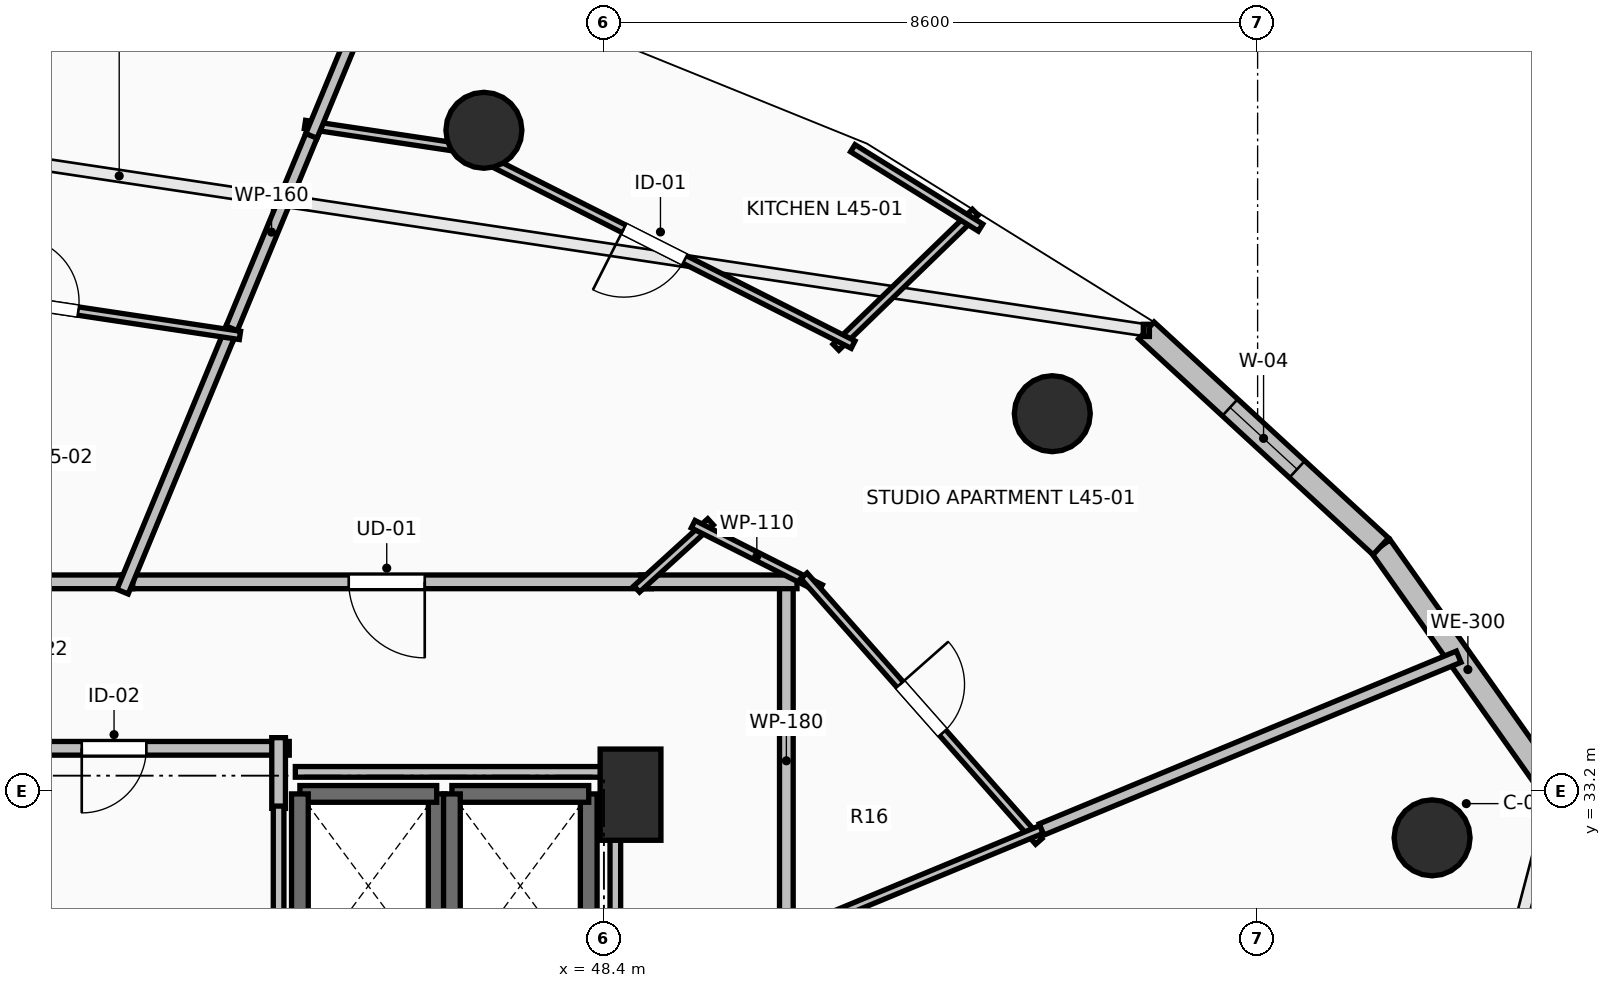
"""IFC4 building model, lengths in metres.
Left out: names, types, materials, properties, quantities, classifications, styles, units other than length and angle.
Written with IfcOpenShell. Run it as: python <this file> out.ifc"""

import sys

from ifc_helpers import new_model, si_unit, direction, frame, frame_2d, origin, origin_2d, place, context, subcontext, project, spatial, rectangle, circle, extrude, element, fill, save


model = new_model("IFC4")
c1 = context("Model", 3, precision=1e-05, world=origin(), true_north=direction((0.0, 1.0)))
c2 = subcontext(c1, "Body", "Model", "MODEL_VIEW")
j1 = project(units=[si_unit("LENGTHUNIT", "METRE"), si_unit("PLANEANGLEUNIT", "RADIAN")], contexts=[c1])
p1 = place(None, origin())
s1 = spatial("IfcSite", under=j1, at=p1, CompositionType="ELEMENT")
p2 = place(p1, origin())
s2 = spatial("IfcBuilding", under=s1, at=p2, CompositionType="ELEMENT")
p3 = place(p2, frame((0.0, 0.0, 167.6)))
s3 = spatial("IfcBuildingStorey", under=s2, at=p3, CompositionType="ELEMENT", Elevation=167.6)
for number, where, z_axis, x_axis in (
    (1, (59.295, 32.582, 0.0), (0.0, 0.0, 1.0), (0.924, 0.383, 0.0)),
    (2, (54.299, 38.162, 0.0), (0.0, 0.0, 1.0), (0.707, 0.707, 0.0)),
    (3, (46.821, 41.891, 0.0), (0.0, 0.0, 1.0), (0.383, 0.924, 0.0)),
):
    element("IfcColumn", number, at=place(p3, frame(where, z_axis=z_axis, x_axis=x_axis)), inside=s3, PredefinedType="COLUMN", context=c2, shape_type="SweptSolid", body=[
        extrude(circle(Radius=0.5, at=origin_2d()), origin(), (0.0, 0.0, 1.0), 3.5),
    ])
p4 = place(p3, frame((48.75, 33.15, 0.0), z_axis=(0.0, 0.0, 1.0), x_axis=(1.0, 0.0, 0.0)))
e4 = element("IfcColumn", 4, at=p4, inside=s3, PredefinedType="PILASTER", context=c2, shape_type="SweptSolid", body=[
    extrude(rectangle(XDim=0.8, YDim=1.2, at=origin_2d()), origin(), (0.0, 0.0, 1.0), 3.5),
])
p5 = place(p3, frame((60.912, 33.175, 0.0), z_axis=(0.0, 0.0, 1.0), x_axis=(-0.577269753207, 0.816553508371, 0.0)))
e5 = element("IfcWall", 5, at=p5, inside=s3, PredefinedType="STANDARD", context=c2, shape_type="SweptSolid", body=[
    extrude(rectangle(XDim=3.97, YDim=0.3, at=frame_2d((1.985, 0.0))), origin(), (0.0, 0.0, 1.0), 3.24),
])
p6 = place(p3, frame((58.62, 36.417, 0.0), z_axis=(0.0, 0.0, 1.0), x_axis=(-0.735477154165, 0.677549522693, 0.0)))
e6 = element("IfcWall", 6, at=p6, inside=s3, PredefinedType="STANDARD", context=c2, shape_type="SweptSolid", body=[
    extrude(rectangle(XDim=4.194, YDim=0.3, at=frame_2d((2.097, 0.0))), origin(), (0.0, 0.0, 1.0), 3.24),
])
p7 = place(p6, frame((1.497, 0.0, 0.85)))
e7 = element("IfcOpeningElement", 7, at=p7, cuts=e6, PredefinedType="OPENING", context=c2, shape_type="SweptSolid", body=[
    extrude(rectangle(XDim=1.2, YDim=1.95, at=frame_2d((0.6, 0.975))), frame((0.0, 0.165, 0.0), z_axis=(0.0, -1.0, 0.0), x_axis=(1.0, 0.0, 0.0)), (0.0, 0.0, 1.0), 0.33),
])
p8 = place(p3, frame((46.2, 30.74, 0.0), z_axis=(0.0, 0.0, 1.0), x_axis=(0.0, 1.0, 0.0)))
e8 = element("IfcWall", 8, at=p8, inside=s3, PredefinedType="SOLIDWALL", context=c2, shape_type="SweptSolid", body=[
    extrude(rectangle(XDim=2.42, YDim=0.22, at=frame_2d((1.21, 0.0))), origin(), (0.0, 0.0, 1.0), 3.24),
])
p9 = place(p3, frame((46.2, 33.16, 0.0), z_axis=(0.0, 0.0, 1.0), x_axis=(-1.0, 0.0, 0.0)))
e9 = element("IfcWall", 9, at=p9, inside=s3, PredefinedType="SOLIDWALL", context=c2, shape_type="SweptSolid", body=[
    extrude(rectangle(XDim=1.8, YDim=0.22, at=frame_2d((0.9, 0.0))), origin(), (0.0, 0.0, 1.0), 3.24),
])
for number, where, z_axis, x_axis in (
    (10, (44.4, 33.16, 0.0), (0.0, 0.0, 1.0), (0.0, -1.0, 0.0)),
    (11, (48.2, 30.74, 0.0), (0.0, 0.0, 1.0), (0.0, 1.0, 0.0)),
):
    element("IfcWall", number, at=place(p3, frame(where, z_axis=z_axis, x_axis=x_axis)), inside=s3, PredefinedType="SOLIDWALL", context=c2, shape_type="SweptSolid", body=[
        extrude(rectangle(XDim=2.42, YDim=0.22, at=frame_2d((1.21, 0.0))), origin(), (0.0, 0.0, 1.0), 3.24),
    ])
p10 = place(p3, frame((48.2, 33.16, 0.0), z_axis=(0.0, 0.0, 1.0), x_axis=(-1.0, 0.0, 0.0)))
e12 = element("IfcWall", 12, at=p10, inside=s3, PredefinedType="SOLIDWALL", context=c2, shape_type="SweptSolid", body=[
    extrude(rectangle(XDim=1.8, YDim=0.22, at=frame_2d((0.9, 0.0))), origin(), (0.0, 0.0, 1.0), 3.24),
])
p11 = place(p3, frame((46.4, 33.16, 0.0), z_axis=(0.0, 0.0, 1.0), x_axis=(0.0, -1.0, 0.0)))
e13 = element("IfcWall", 13, at=p11, inside=s3, PredefinedType="SOLIDWALL", context=c2, shape_type="SweptSolid", body=[
    extrude(rectangle(XDim=2.42, YDim=0.22, at=frame_2d((1.21, 0.0))), origin(), (0.0, 0.0, 1.0), 3.24),
])
p12 = place(p3, frame((44.26, 33.76, 0.0), z_axis=(0.0, 0.0, 1.0), x_axis=(-1.0, 0.0, 0.0)))
e14 = element("IfcWall", 14, at=p12, inside=s3, PredefinedType="PARTITIONING", context=c2, shape_type="SweptSolid", body=[
    extrude(rectangle(XDim=4.61, YDim=0.18, at=frame_2d((2.305, 0.0))), origin(), (0.0, 0.0, 1.0), 3.24),
])
p13 = place(p12, frame((1.88, 0.0, 0.0)))
e15 = element("IfcOpeningElement", 15, at=p13, cuts=e14, PredefinedType="OPENING", context=c2, shape_type="SweptSolid", body=[
    extrude(rectangle(XDim=0.85, YDim=2.1, at=frame_2d((0.425, 1.05))), frame((0.0, 0.105, 0.0), z_axis=(0.0, -1.0, 0.0), x_axis=(1.0, 0.0, 0.0)), (0.0, 0.0, 1.0), 0.21),
])
p14 = place(p3, frame((44.12, 32.97, 0.0), z_axis=(0.0, 0.0, 1.0), x_axis=(0.0, 1.0, 0.0)))
e16 = element("IfcWall", 16, at=p14, inside=s3, PredefinedType="PARTITIONING", context=c2, shape_type="SweptSolid", body=[
    extrude(rectangle(XDim=0.93, YDim=0.18, at=frame_2d((0.465, 0.0))), origin(), (0.0, 0.0, 1.0), 3.24),
])
p15 = place(p3, frame((49.024, 35.95, 0.0), z_axis=(0.0, 0.0, 1.0), x_axis=(-1.0, 0.0, 0.0)))
e17 = element("IfcWall", 17, at=p15, inside=s3, PredefinedType="PARTITIONING", context=c2, shape_type="SweptSolid", body=[
    extrude(rectangle(XDim=6.963, YDim=0.18, at=frame_2d((3.481, 0.0))), origin(), (0.0, 0.0, 1.0), 2.432),
])
p16 = place(p15, frame((2.981, 0.0, 0.0)))
e18 = element("IfcOpeningElement", 18, at=p16, cuts=e17, PredefinedType="OPENING", context=c2, shape_type="SweptSolid", body=[
    extrude(rectangle(XDim=1.0, YDim=2.15, at=frame_2d((0.5, 1.075))), frame((0.0, 0.105, 0.0), z_axis=(0.0, -1.0, 0.0), x_axis=(1.0, 0.0, 0.0)), (0.0, 0.0, 1.0), 0.21),
])
p17 = place(p3, frame((50.8, 31.102, 0.0), z_axis=(0.0, 0.0, 1.0), x_axis=(0.0, 1.0, 0.0)))
e19 = element("IfcWall", 19, at=p17, inside=s3, PredefinedType="PARTITIONING", context=c2, shape_type="SweptSolid", body=[
    extrude(rectangle(XDim=4.988, YDim=0.18, at=frame_2d((2.494, 0.0))), origin(), (0.0, 0.0, 1.0), 2.432),
])
p18 = place(p3, frame((50.94, 35.95, 0.0), z_axis=(0.0, 0.0, 1.0), x_axis=(-1.0, 0.0, 0.0)))
e20 = element("IfcWall", 20, at=p18, inside=s3, PredefinedType="PARTITIONING", context=c2, shape_type="SweptSolid", body=[
    extrude(rectangle(XDim=2.056, YDim=0.18, at=frame_2d((1.028, 0.0))), origin(), (0.0, 0.0, 1.0), 2.874),
])
p19 = place(p3, frame((42.201, 35.95, 0.0), z_axis=(0.0, 0.0, 1.0), x_axis=(-1.0, 0.0, 0.0)))
e21 = element("IfcWall", 21, at=p19, inside=s3, PredefinedType="PARTITIONING", context=c2, shape_type="SweptSolid", body=[
    extrude(rectangle(XDim=3.812, YDim=0.18, at=frame_2d((1.906, 0.0))), origin(), (0.0, 0.0, 1.0), 3.24),
])
p20 = place(p3, frame((48.831, 35.856, 0.0), z_axis=(0.0, 0.0, 1.0), x_axis=(0.739696022243, 0.672941152463, 0.0)))
e22 = element("IfcWall", 22, at=p20, inside=s3, PredefinedType="PARTITIONING", context=c2, shape_type="SweptSolid", body=[
    extrude(rectangle(XDim=1.313, YDim=0.11, at=frame_2d((0.656, 0.0))), origin(), (0.0, 0.0, 1.0), 2.874),
])
p21 = place(p3, frame((49.574, 36.708, 0.0), z_axis=(0.0, 0.0, 1.0), x_axis=(0.8925722309, -0.450904438464, 0.0)))
e23 = element("IfcWall", 23, at=p21, inside=s3, PredefinedType="PARTITIONING", context=c2, shape_type="SweptSolid", body=[
    extrude(rectangle(XDim=1.877, YDim=0.11, at=frame_2d((0.938, 0.0))), origin(), (0.0, 0.0, 1.0), 3.24),
])
p22 = place(p3, frame((51.031, 36.03, 0.0), z_axis=(0.0, 0.0, 1.0), x_axis=(0.662223763999, -0.749306136632, 0.0)))
e24 = element("IfcWall", 24, at=p22, inside=s3, PredefinedType="PARTITIONING", context=c2, shape_type="SweptSolid", body=[
    extrude(rectangle(XDim=4.665, YDim=0.11, at=frame_2d((2.333, 0.0))), origin(), (0.0, 0.0, 1.0), 2.432),
])
p23 = place(p22, frame((1.908, 0.0, 0.0)))
e25 = element("IfcOpeningElement", 25, at=p23, cuts=e24, PredefinedType="OPENING", context=c2, shape_type="SweptSolid", body=[
    extrude(rectangle(XDim=0.85, YDim=2.1, at=frame_2d((0.425, 1.05))), frame((0.0, 0.07, 0.0), z_axis=(0.0, -1.0, 0.0), x_axis=(1.0, 0.0, 0.0)), (0.0, 0.0, 1.0), 0.14),
])
p24 = place(p3, frame((54.157, 32.693, 0.0), z_axis=(0.0, 0.0, 1.0), x_axis=(-0.923865440054, -0.382717452795, 0.0)))
e26 = element("IfcWall", 26, at=p24, inside=s3, PredefinedType="PARTITIONING", context=c2, shape_type="SweptSolid", body=[
    extrude(rectangle(XDim=3.774, YDim=0.11, at=frame_2d((1.887, 0.0))), origin(), (0.0, 0.0, 1.0), 2.432),
])
p25 = place(p3, frame((53.286, 40.812, 0.0), z_axis=(0.0, 0.0, 1.0), x_axis=(-0.718256654627, -0.69577825353, 0.0)))
e27 = element("IfcWall", 27, at=p25, inside=s3, PredefinedType="PARTITIONING", context=c2, shape_type="SweptSolid", body=[
    extrude(rectangle(XDim=2.552, YDim=0.11, at=frame_2d((1.276, 0.0))), origin(), (0.0, 0.0, 1.0), 2.728),
])
p26 = place(p3, frame((51.678, 39.071, 0.0), z_axis=(0.0, 0.0, 1.0), x_axis=(-0.892519613246, 0.451008580818, 0.0)))
e28 = element("IfcWall", 28, at=p26, inside=s3, PredefinedType="PARTITIONING", context=c2, shape_type="SweptSolid", body=[
    extrude(rectangle(XDim=5.861, YDim=0.11, at=frame_2d((2.93, 0.0))), origin(), (0.0, 0.0, 1.0), 2.432),
])
p27 = place(p26, frame((2.48, 0.0, 0.0)))
e29 = element("IfcOpeningElement", 29, at=p27, cuts=e28, PredefinedType="OPENING", context=c2, shape_type="SweptSolid", body=[
    extrude(rectangle(XDim=0.9, YDim=2.1, at=frame_2d((0.45, 1.05))), frame((0.0, 0.07, 0.0), z_axis=(0.0, -1.0, 0.0), x_axis=(1.0, 0.0, 0.0)), (0.0, 0.0, 1.0), 0.14),
])
p28 = place(p3, frame((46.71, 41.63, 0.0), z_axis=(0.0, 0.0, 1.0), x_axis=(-0.988930827604, 0.14837728335, 0.0)))
e30 = element("IfcWall", 30, at=p28, inside=s3, PredefinedType="PARTITIONING", context=c2, shape_type="SweptSolid", body=[
    extrude(rectangle(XDim=2.269, YDim=0.11, at=frame_2d((1.135, 0.0))), origin(), (0.0, 0.0, 1.0), 3.24),
])
p29 = place(p3, frame((53.355, 40.61, 0.0), z_axis=(0.0, 0.0, 1.0), x_axis=(-0.8493331579, 0.527857165237, 0.0)))
e31 = element("IfcWall", 31, at=p29, inside=s3, PredefinedType="PARTITIONING", context=c2, shape_type="SweptSolid", body=[
    extrude(rectangle(XDim=1.979, YDim=0.11, at=frame_2d((0.99, 0.0))), origin(), (0.0, 0.0, 1.0), 3.24),
])
p30 = place(p3, frame((44.605, 41.946, 0.0), z_axis=(0.0, 0.0, 1.0), x_axis=(-0.382777783416, -0.923840445382, 0.0)))
e32 = element("IfcWall", 32, at=p30, inside=s3, PredefinedType="PARTITIONING", context=c2, shape_type="SweptSolid", body=[
    extrude(rectangle(XDim=3.02, YDim=0.16, at=frame_2d((1.51, 0.0))), origin(), (0.0, 0.0, 1.0), 2.929),
])
p31 = place(p3, frame((43.503, 39.285, 0.0), z_axis=(0.0, 0.0, 1.0), x_axis=(-0.382867331148, -0.923803337697, 0.0)))
e33 = element("IfcWall", 33, at=p31, inside=s3, PredefinedType="PARTITIONING", context=c2, shape_type="SweptSolid", body=[
    extrude(rectangle(XDim=3.75, YDim=0.16, at=frame_2d((1.875, 0.0))), origin(), (0.0, 0.0, 1.0), 2.874),
])
p32 = place(p3, frame((54.157, 32.692, 0.0), z_axis=(0.0, 0.0, 1.0), x_axis=(0.923898107484, 0.382638585335, 0.0)))
e34 = element("IfcWall", 34, at=p32, inside=s3, PredefinedType="PARTITIONING", context=c2, shape_type="SweptSolid", body=[
    extrude(rectangle(XDim=5.939, YDim=0.16, at=frame_2d((2.97, 0.0))), origin(), (0.0, 0.0, 1.0), 2.432),
])
p33 = place(p3, frame((45.43, 43.936, 0.0), z_axis=(0.0, 0.0, 1.0), x_axis=(-0.382755897173, -0.923849513276, 0.0)))
e35 = element("IfcWall", 35, at=p33, inside=s3, PredefinedType="PARTITIONING", context=c2, shape_type="SweptSolid", body=[
    extrude(rectangle(XDim=2.294, YDim=0.16, at=frame_2d((1.147, 0.0))), origin(), (0.0, 0.0, 1.0), 2.728),
])
p34 = place(p3, frame((38.519, 39.958, 0.0), z_axis=(0.0, 0.0, 1.0), x_axis=(0.988887618714, -0.14866498429, 0.0)))
e36 = element("IfcWall", 36, at=p34, inside=s3, PredefinedType="PARTITIONING", context=c2, shape_type="SweptSolid", body=[
    extrude(rectangle(XDim=5.15, YDim=0.11, at=frame_2d((2.575, 0.0))), origin(), (0.0, 0.0, 1.0), 2.929),
])
p35 = place(p34, frame((2.15, 0.0, 0.0)))
e37 = element("IfcOpeningElement", 37, at=p35, cuts=e36, PredefinedType="OPENING", context=c2, shape_type="SweptSolid", body=[
    extrude(rectangle(XDim=0.85, YDim=2.1, at=frame_2d((0.425, 1.05))), frame((0.0, 0.07, 0.0), z_axis=(0.0, -1.0, 0.0), x_axis=(1.0, 0.0, 0.0)), (0.0, 0.0, 1.0), 0.14),
])
p36 = place(p3, frame((44.12, 30.34, 0.0), z_axis=(0.0, 0.0, 1.0), x_axis=(0.0, 1.0, 0.0)))
e38 = element("IfcWall", 38, at=p36, inside=s3, PredefinedType="PARTITIONING", context=c2, shape_type="SweptSolid", body=[
    extrude(rectangle(XDim=2.66, YDim=0.14, at=frame_2d((1.33, 0.0))), origin(), (0.0, 0.0, 1.0), 3.24),
])
p37 = place(p3, frame((48.55, 28.196, 0.0), z_axis=(0.0, 0.0, 1.0), x_axis=(0.0, 1.0, 0.0)))
e39 = element("IfcWall", 39, at=p37, inside=s3, PredefinedType="PARTITIONING", context=c2, shape_type="SweptSolid", body=[
    extrude(rectangle(XDim=5.254, YDim=0.14, at=frame_2d((2.627, 0.0))), origin(), (0.0, 0.0, 1.0), 2.432),
])
p38 = place(p3, frame((48.55, 33.45, 0.0), z_axis=(0.0, 0.0, 1.0), x_axis=(-1.0, 0.0, 0.0)))
e40 = element("IfcWall", 40, at=p38, inside=s3, PredefinedType="PARTITIONING", context=c2, shape_type="SweptSolid", body=[
    extrude(rectangle(XDim=4.21, YDim=0.14, at=frame_2d((2.105, 0.0))), origin(), (0.0, 0.0, 1.0), 2.432),
])
p39 = place(p7, origin())
e41 = element("IfcWindow", 41, at=p39, inside=s3, PartitioningType="SINGLE_PANEL", PredefinedType="WINDOW", context=c2, shape_type="SweptSolid", body=[
    extrude(rectangle(XDim=1.2, YDim=1.95, at=frame_2d((0.6, 0.975))), frame((0.0, 0.03, 0.0), z_axis=(0.0, -1.0, 0.0), x_axis=(1.0, 0.0, 0.0)), (0.0, 0.0, 1.0), 0.06),
])
fill(e7, e41)
p40 = place(p13, origin())
e42 = element("IfcDoor", 42, at=p40, inside=s3, OperationType="SINGLE_SWING_RIGHT", PredefinedType="DOOR", context=c2, shape_type="SweptSolid", body=[
    extrude(rectangle(XDim=0.85, YDim=2.1, at=frame_2d((0.425, 1.05))), frame((0.0, 0.025, 0.0), z_axis=(0.0, -1.0, 0.0), x_axis=(1.0, 0.0, 0.0)), (0.0, 0.0, 1.0), 0.05),
])
fill(e15, e42)
p41 = place(p16, origin())
e43 = element("IfcDoor", 43, at=p41, inside=s3, OperationType="SINGLE_SWING_LEFT", PredefinedType="DOOR", context=c2, shape_type="SweptSolid", body=[
    extrude(rectangle(XDim=1.0, YDim=2.15, at=frame_2d((0.5, 1.075))), frame((0.0, 0.025, 0.0), z_axis=(0.0, -1.0, 0.0), x_axis=(1.0, 0.0, 0.0)), (0.0, 0.0, 1.0), 0.05),
])
fill(e18, e43)
p42 = place(p23, origin())
e44 = element("IfcDoor", 44, at=p42, inside=s3, OperationType="SINGLE_SWING_LEFT", PredefinedType="DOOR", context=c2, shape_type="SweptSolid", body=[
    extrude(rectangle(XDim=0.85, YDim=2.1, at=frame_2d((0.425, 1.05))), frame((0.0, 0.025, 0.0), z_axis=(0.0, -1.0, 0.0), x_axis=(1.0, 0.0, 0.0)), (0.0, 0.0, 1.0), 0.05),
])
fill(e25, e44)
p43 = place(p27, origin())
e45 = element("IfcDoor", 45, at=p43, inside=s3, OperationType="SINGLE_SWING_RIGHT", PredefinedType="DOOR", context=c2, shape_type="SweptSolid", body=[
    extrude(rectangle(XDim=0.9, YDim=2.1, at=frame_2d((0.45, 1.05))), frame((0.0, 0.025, 0.0), z_axis=(0.0, -1.0, 0.0), x_axis=(1.0, 0.0, 0.0)), (0.0, 0.0, 1.0), 0.05),
])
fill(e29, e45)
p44 = place(p35, origin())
e46 = element("IfcDoor", 46, at=p44, inside=s3, OperationType="SINGLE_SWING_LEFT", PredefinedType="DOOR", context=c2, shape_type="SweptSolid", body=[
    extrude(rectangle(XDim=0.85, YDim=2.1, at=frame_2d((0.425, 1.05))), frame((0.0, 0.025, 0.0), z_axis=(0.0, -1.0, 0.0), x_axis=(1.0, 0.0, 0.0)), (0.0, 0.0, 1.0), 0.05),
])
fill(e37, e46)
save(model, sys.argv[1])
